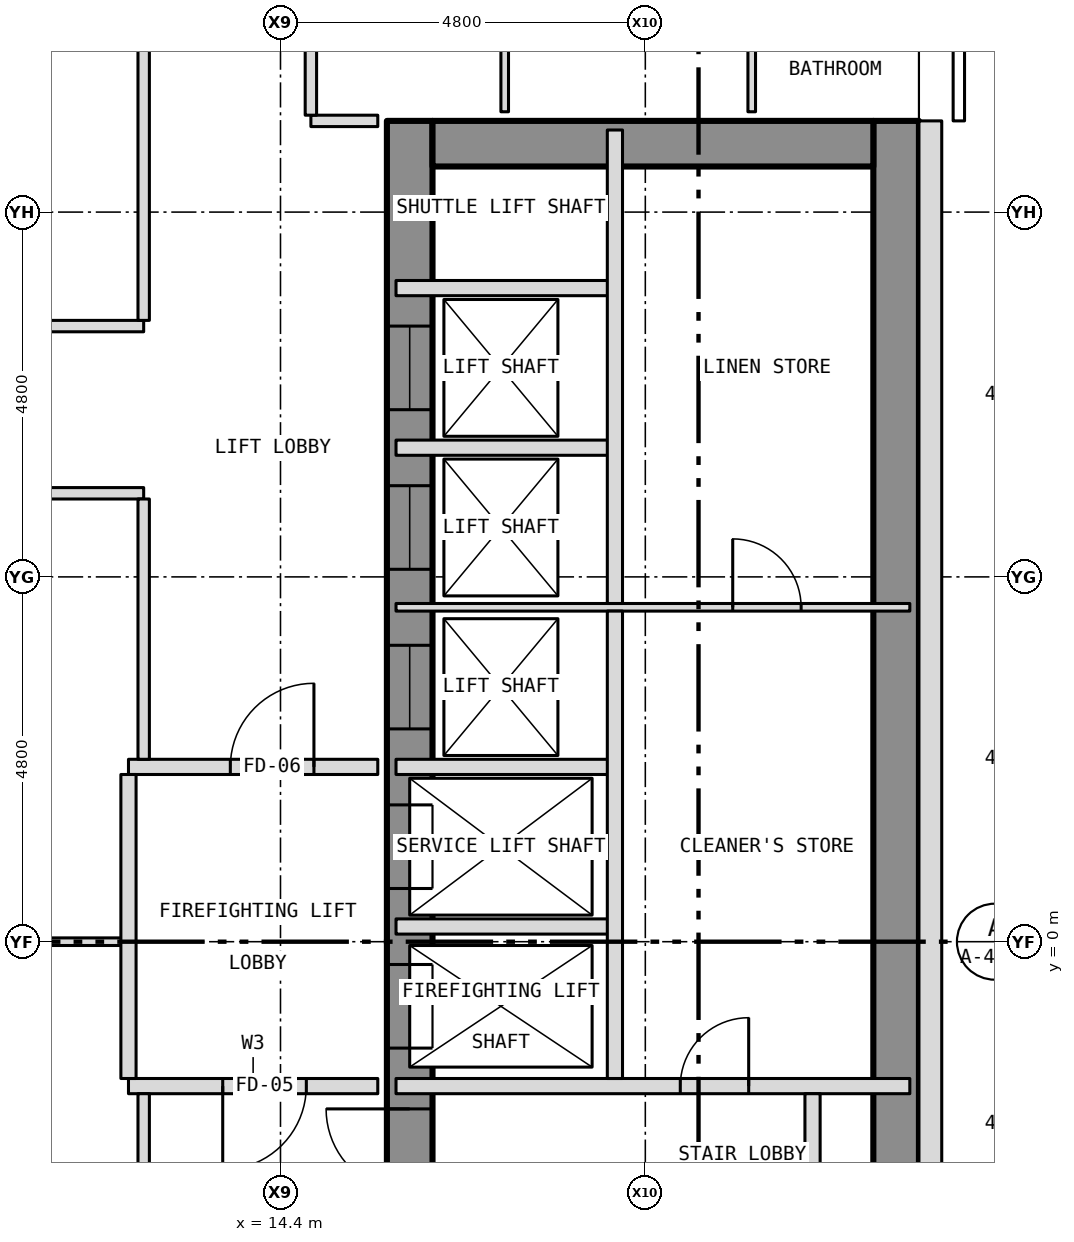
"""IFC4 building model, lengths in metres.
Left out: names, types, materials, properties, quantities, classifications, styles, units other than length and angle.
Written with IfcOpenShell. Run it as: python <this file> out.ifc"""

import sys

from ifc_helpers import new_model, si_unit, direction, frame, frame_2d, origin, place, context, subcontext, project, spatial, rectangle, extrude, element, fill, save


model = new_model("IFC4")
c1 = context("Model", 3, precision=1e-05, world=origin(), true_north=direction((0.0, 1.0)))
c2 = subcontext(c1, "Body", "Model", "MODEL_VIEW")
j1 = project(units=[si_unit("LENGTHUNIT", "METRE"), si_unit("PLANEANGLEUNIT", "RADIAN")], contexts=[c1])
p1 = place(None, origin())
s1 = spatial("IfcSite", under=j1, at=p1, CompositionType="ELEMENT")
p2 = place(p1, origin())
s2 = spatial("IfcBuilding", under=s1, at=p2, CompositionType="ELEMENT")
p3 = place(p2, frame((0.0, 0.0, 96.0)))
s3 = spatial("IfcBuildingStorey", under=s2, at=p3, CompositionType="ELEMENT", Elevation=96.0)
p4 = place(p3, frame((16.1, -10.8, 0.0), z_axis=(0.0, 0.0, 1.0), x_axis=(0.0, 1.0, 0.0)))
e1 = element("IfcWall", 1, at=p4, inside=s3, PredefinedType="SHEAR", context=c2, shape_type="SweptSolid", body=[
    extrude(rectangle(XDim=21.6, YDim=0.6, at=frame_2d((10.8, 0.0))), origin(), (0.0, 0.0, 1.0), 3.25),
])
p5 = place(p4, frame((9.4, 0.0, 0.0)))
e2 = element("IfcOpeningElement", 2, at=p5, cuts=e1, PredefinedType="OPENING", context=c2, shape_type="SweptSolid", body=[
    extrude(rectangle(XDim=1.1, YDim=2.1, at=frame_2d((0.55, 1.05))), frame((0.0, 0.312, 0.0), z_axis=(0.0, -1.0, 0.0), x_axis=(1.0, 0.0, 0.0)), (0.0, 0.0, 1.0), 0.624),
])
p6 = place(p4, frame((11.5, 0.0, 0.0)))
e3 = element("IfcOpeningElement", 3, at=p6, cuts=e1, PredefinedType="OPENING", context=c2, shape_type="SweptSolid", body=[
    extrude(rectangle(XDim=1.1, YDim=2.1, at=frame_2d((0.55, 1.05))), frame((0.0, 0.312, 0.0), z_axis=(0.0, -1.0, 0.0), x_axis=(1.0, 0.0, 0.0)), (0.0, 0.0, 1.0), 0.624),
])
p7 = place(p4, frame((13.6, 0.0, 0.0)))
e4 = element("IfcOpeningElement", 4, at=p7, cuts=e1, PredefinedType="OPENING", context=c2, shape_type="SweptSolid", body=[
    extrude(rectangle(XDim=1.1, YDim=2.1, at=frame_2d((0.55, 1.05))), frame((0.0, 0.312, 0.0), z_axis=(0.0, -1.0, 0.0), x_axis=(1.0, 0.0, 0.0)), (0.0, 0.0, 1.0), 0.624),
])
p8 = place(p4, frame((15.7, 0.0, 0.0)))
e5 = element("IfcOpeningElement", 5, at=p8, cuts=e1, PredefinedType="OPENING", context=c2, shape_type="SweptSolid", body=[
    extrude(rectangle(XDim=1.1, YDim=2.1, at=frame_2d((0.55, 1.05))), frame((0.0, 0.312, 0.0), z_axis=(0.0, -1.0, 0.0), x_axis=(1.0, 0.0, 0.0)), (0.0, 0.0, 1.0), 0.624),
])
p9 = place(p4, frame((17.8, 0.0, 0.0)))
e6 = element("IfcOpeningElement", 6, at=p9, cuts=e1, PredefinedType="OPENING", context=c2, shape_type="SweptSolid", body=[
    extrude(rectangle(XDim=1.1, YDim=2.1, at=frame_2d((0.55, 1.05))), frame((0.0, 0.312, 0.0), z_axis=(0.0, -1.0, 0.0), x_axis=(1.0, 0.0, 0.0)), (0.0, 0.0, 1.0), 0.624),
])
p10 = place(p4, frame((5.642, 0.0, 0.0)))
e7 = element("IfcOpeningElement", 7, at=p10, cuts=e1, PredefinedType="OPENING", context=c2, shape_type="SweptSolid", body=[
    extrude(rectangle(XDim=1.1, YDim=2.1, at=frame_2d((0.55, 1.05))), frame((0.0, 0.312, 0.0), z_axis=(0.0, -1.0, 0.0), x_axis=(1.0, 0.0, 0.0)), (0.0, 0.0, 1.0), 0.624),
])
p11 = place(p4, frame((7.5, 0.0, 0.0)))
e8 = element("IfcOpeningElement", 8, at=p11, cuts=e1, PredefinedType="OPENING", context=c2, shape_type="SweptSolid", body=[
    extrude(rectangle(XDim=1.1, YDim=2.1, at=frame_2d((0.55, 1.05))), frame((0.0, 0.312, 0.0), z_axis=(0.0, -1.0, 0.0), x_axis=(1.0, 0.0, 0.0)), (0.0, 0.0, 1.0), 0.624),
])
p12 = place(p3, frame((22.5, -10.8, 0.0), z_axis=(0.0, 0.0, 1.0), x_axis=(0.0, 1.0, 0.0)))
e9 = element("IfcWall", 9, at=p12, inside=s3, PredefinedType="SHEAR", context=c2, shape_type="SweptSolid", body=[
    extrude(rectangle(XDim=21.6, YDim=0.6, at=frame_2d((10.8, 0.0))), origin(), (0.0, 0.0, 1.0), 3.25),
])
p13 = place(p3, frame((16.4, 10.5, 0.0), z_axis=(0.0, 0.0, 1.0), x_axis=(1.0, 0.0, 0.0)))
e10 = element("IfcWall", 10, at=p13, inside=s3, PredefinedType="SHEAR", context=c2, shape_type="SweptSolid", body=[
    extrude(rectangle(XDim=5.8, YDim=0.6, at=frame_2d((2.9, 0.0))), origin(), (0.0, 0.0, 1.0), 3.25),
])
p14 = place(p3, frame((22.95, -10.8, 0.0), z_axis=(0.0, 0.0, 1.0), x_axis=(0.0, 1.0, 0.0)))
e11 = element("IfcWall", 11, at=p14, inside=s3, PredefinedType="SOLIDWALL", context=c2, shape_type="SweptSolid", body=[
    extrude(rectangle(XDim=21.6, YDim=0.3, at=frame_2d((10.8, 0.0))), origin(), (0.0, 0.0, 1.0), 3.5),
])
p15 = place(p14, frame((2.95, 0.0, 1.0)))
e12 = element("IfcOpeningElement", 12, at=p15, cuts=e11, PredefinedType="OPENING", context=c2, shape_type="SweptSolid", body=[
    extrude(rectangle(XDim=0.6, YDim=1.5, at=frame_2d((0.3, 0.75))), frame((0.0, 0.162, 0.0), z_axis=(0.0, -1.0, 0.0), x_axis=(1.0, 0.0, 0.0)), (0.0, 0.0, 1.0), 0.324),
])
p16 = place(p3, frame((12.4, -1.9, 0.0), z_axis=(0.0, 0.0, 1.0), x_axis=(1.0, 0.0, 0.0)))
e13 = element("IfcWall", 13, at=p16, inside=s3, PredefinedType="PARTITIONING", context=c2, shape_type="SweptSolid", body=[
    extrude(rectangle(XDim=3.28, YDim=0.2, at=frame_2d((1.64, 0.0))), origin(), (0.0, 0.0, 1.0), 3.35),
])
p17 = place(p16, frame((1.24, 0.0, 0.0)))
e14 = element("IfcOpeningElement", 14, at=p17, cuts=e13, PredefinedType="OPENING", context=c2, shape_type="SweptSolid", body=[
    extrude(rectangle(XDim=1.1, YDim=2.1, at=frame_2d((0.55, 1.05))), frame((0.0, 0.112, 0.0), z_axis=(0.0, -1.0, 0.0), x_axis=(1.0, 0.0, 0.0)), (0.0, 0.0, 1.0), 0.224),
])
p18 = place(p3, frame((15.92, -1.9, 0.0), z_axis=(0.0, 0.0, 1.0), x_axis=(1.0, 0.0, 0.0)))
e15 = element("IfcWall", 15, at=p18, inside=s3, PredefinedType="PARTITIONING", context=c2, shape_type="SweptSolid", body=[
    extrude(rectangle(XDim=6.76, YDim=0.2, at=frame_2d((3.38, 0.0))), origin(), (0.0, 0.0, 1.0), 3.25),
])
p19 = place(p18, frame((3.74, 0.0, 0.0)))
e16 = element("IfcOpeningElement", 16, at=p19, cuts=e15, PredefinedType="OPENING", context=c2, shape_type="SweptSolid", body=[
    extrude(rectangle(XDim=0.9, YDim=2.1, at=frame_2d((0.45, 1.05))), frame((0.0, 0.112, 0.0), z_axis=(0.0, -1.0, 0.0), x_axis=(1.0, 0.0, 0.0)), (0.0, 0.0, 1.0), 0.224),
])
p20 = place(p3, frame((9.799, 0.0, 0.0), z_axis=(0.0, 0.0, 1.0), x_axis=(1.0, 0.0, 0.0)))
e17 = element("IfcWall", 17, at=p20, inside=s3, PredefinedType="PARTITIONING", context=c2, shape_type="SweptSolid", body=[
    extrude(rectangle(XDim=2.601, YDim=0.1, at=frame_2d((1.3, 0.0))), origin(), (0.0, 0.0, 1.0), 2.728),
])
p21 = place(p3, frame((15.92, 0.2, 0.0), z_axis=(0.0, 0.0, 1.0), x_axis=(1.0, 0.0, 0.0)))
e18 = element("IfcWall", 18, at=p21, inside=s3, PredefinedType="PARTITIONING", context=c2, shape_type="SweptSolid", body=[
    extrude(rectangle(XDim=2.88, YDim=0.2, at=frame_2d((1.44, 0.0))), origin(), (0.0, 0.0, 1.0), 3.25),
])
p22 = place(p3, frame((12.4, 2.3, 0.0), z_axis=(0.0, 0.0, 1.0), x_axis=(1.0, 0.0, 0.0)))
e19 = element("IfcWall", 19, at=p22, inside=s3, PredefinedType="PARTITIONING", context=c2, shape_type="SweptSolid", body=[
    extrude(rectangle(XDim=3.28, YDim=0.2, at=frame_2d((1.64, 0.0))), origin(), (0.0, 0.0, 1.0), 3.35),
])
p23 = place(p22, frame((1.34, 0.0, 0.0)))
e20 = element("IfcOpeningElement", 20, at=p23, cuts=e19, PredefinedType="OPENING", context=c2, shape_type="SweptSolid", body=[
    extrude(rectangle(XDim=1.1, YDim=2.1, at=frame_2d((0.55, 1.05))), frame((0.0, 0.112, 0.0), z_axis=(0.0, -1.0, 0.0), x_axis=(1.0, 0.0, 0.0)), (0.0, 0.0, 1.0), 0.224),
])
p24 = place(p3, frame((15.92, 2.3, 0.0), z_axis=(0.0, 0.0, 1.0), x_axis=(1.0, 0.0, 0.0)))
e21 = element("IfcWall", 21, at=p24, inside=s3, PredefinedType="PARTITIONING", context=c2, shape_type="SweptSolid", body=[
    extrude(rectangle(XDim=2.88, YDim=0.2, at=frame_2d((1.44, 0.0))), origin(), (0.0, 0.0, 1.0), 3.25),
])
p25 = place(p3, frame((15.92, 4.4, 0.0), z_axis=(0.0, 0.0, 1.0), x_axis=(1.0, 0.0, 0.0)))
e22 = element("IfcWall", 22, at=p25, inside=s3, PredefinedType="PARTITIONING", context=c2, shape_type="SweptSolid", body=[
    extrude(rectangle(XDim=6.76, YDim=0.1, at=frame_2d((3.38, 0.0))), origin(), (0.0, 0.0, 1.0), 3.25),
])
p26 = place(p25, frame((4.43, 0.0, 0.0)))
e23 = element("IfcOpeningElement", 23, at=p26, cuts=e22, PredefinedType="OPENING", context=c2, shape_type="SweptSolid", body=[
    extrude(rectangle(XDim=0.9, YDim=2.1, at=frame_2d((0.45, 1.05))), frame((0.0, 0.062, 0.0), z_axis=(0.0, -1.0, 0.0), x_axis=(1.0, 0.0, 0.0)), (0.0, 0.0, 1.0), 0.124),
])
p27 = place(p3, frame((3.3, 5.9, 0.0), z_axis=(0.0, 0.0, 1.0), x_axis=(1.0, 0.0, 0.0)))
e24 = element("IfcWall", 24, at=p27, inside=s3, PredefinedType="PARTITIONING", context=c2, shape_type="SweptSolid", body=[
    extrude(rectangle(XDim=9.3, YDim=0.15, at=frame_2d((4.65, 0.0))), origin(), (0.0, 0.0, 1.0), 3.35),
])
p28 = place(p27, frame((4.2, 0.0, 0.0)))
e25 = element("IfcOpeningElement", 25, at=p28, cuts=e24, PredefinedType="OPENING", context=c2, shape_type="SweptSolid", body=[
    extrude(rectangle(XDim=0.9, YDim=2.1, at=frame_2d((0.45, 1.05))), frame((0.0, 0.087, 0.0), z_axis=(0.0, -1.0, 0.0), x_axis=(1.0, 0.0, 0.0)), (0.0, 0.0, 1.0), 0.174),
])
p29 = place(p3, frame((15.92, 6.5, 0.0), z_axis=(0.0, 0.0, 1.0), x_axis=(1.0, 0.0, 0.0)))
e26 = element("IfcWall", 26, at=p29, inside=s3, PredefinedType="PARTITIONING", context=c2, shape_type="SweptSolid", body=[
    extrude(rectangle(XDim=2.88, YDim=0.2, at=frame_2d((1.44, 0.0))), origin(), (0.0, 0.0, 1.0), 3.25),
])
p30 = place(p3, frame((3.3, 8.1, 0.0), z_axis=(0.0, 0.0, 1.0), x_axis=(1.0, 0.0, 0.0)))
e27 = element("IfcWall", 27, at=p30, inside=s3, PredefinedType="PARTITIONING", context=c2, shape_type="SweptSolid", body=[
    extrude(rectangle(XDim=9.3, YDim=0.15, at=frame_2d((4.65, 0.0))), origin(), (0.0, 0.0, 1.0), 3.35),
])
p31 = place(p3, frame((15.92, 8.6, 0.0), z_axis=(0.0, 0.0, 1.0), x_axis=(1.0, 0.0, 0.0)))
e28 = element("IfcWall", 28, at=p31, inside=s3, PredefinedType="PARTITIONING", context=c2, shape_type="SweptSolid", body=[
    extrude(rectangle(XDim=2.88, YDim=0.2, at=frame_2d((1.44, 0.0))), origin(), (0.0, 0.0, 1.0), 3.25),
])
p32 = place(p3, frame((14.8, 10.8, 0.0), z_axis=(0.0, 0.0, 1.0), x_axis=(1.0, 0.0, 0.0)))
e29 = element("IfcWall", 29, at=p32, inside=s3, PredefinedType="PARTITIONING", context=c2, shape_type="SweptSolid", body=[
    extrude(rectangle(XDim=0.88, YDim=0.15, at=frame_2d((0.44, 0.0))), origin(), (0.0, 0.0, 1.0), 3.35),
])
p33 = place(p3, frame((12.4, -1.8, 0.0), z_axis=(0.0, 0.0, 1.0), x_axis=(0.0, 1.0, 0.0)))
e30 = element("IfcWall", 30, at=p33, inside=s3, PredefinedType="PARTITIONING", context=c2, shape_type="SweptSolid", body=[
    extrude(rectangle(XDim=4.0, YDim=0.2, at=frame_2d((2.0, 0.0))), origin(), (0.0, 0.0, 1.0), 3.35),
])
p34 = place(p3, frame((12.6, -12.525, 0.0), z_axis=(0.0, 0.0, 1.0), x_axis=(0.0, 1.0, 0.0)))
e31 = element("IfcWall", 31, at=p34, inside=s3, PredefinedType="PARTITIONING", context=c2, shape_type="SweptSolid", body=[
    extrude(rectangle(XDim=10.525, YDim=0.15, at=frame_2d((5.262, 0.0))), origin(), (0.0, 0.0, 1.0), 3.35),
])
p35 = place(p3, frame((12.6, 2.4, 0.0), z_axis=(0.0, 0.0, 1.0), x_axis=(0.0, 1.0, 0.0)))
e32 = element("IfcWall", 32, at=p35, inside=s3, PredefinedType="PARTITIONING", context=c2, shape_type="SweptSolid", body=[
    extrude(rectangle(XDim=3.425, YDim=0.15, at=frame_2d((1.712, 0.0))), origin(), (0.0, 0.0, 1.0), 3.35),
])
p36 = place(p3, frame((12.6, 8.175, 0.0), z_axis=(0.0, 0.0, 1.0), x_axis=(0.0, 1.0, 0.0)))
e33 = element("IfcWall", 33, at=p36, inside=s3, PredefinedType="PARTITIONING", context=c2, shape_type="SweptSolid", body=[
    extrude(rectangle(XDim=4.35, YDim=0.15, at=frame_2d((2.175, 0.0))), origin(), (0.0, 0.0, 1.0), 3.35),
])
p37 = place(p3, frame((14.8, 10.875, 0.0), z_axis=(0.0, 0.0, 1.0), x_axis=(0.0, 1.0, 0.0)))
e34 = element("IfcWall", 34, at=p37, inside=s3, PredefinedType="PARTITIONING", context=c2, shape_type="SweptSolid", body=[
    extrude(rectangle(XDim=3.85, YDim=0.15, at=frame_2d((1.925, 0.0))), origin(), (0.0, 0.0, 1.0), 3.35),
])
p38 = place(p37, frame((2.325, 0.0, 0.0)))
e35 = element("IfcOpeningElement", 35, at=p38, cuts=e34, PredefinedType="OPENING", context=c2, shape_type="SweptSolid", body=[
    extrude(rectangle(XDim=1.0, YDim=2.1, at=frame_2d((0.5, 1.05))), frame((0.0, 0.087, 0.0), z_axis=(0.0, -1.0, 0.0), x_axis=(1.0, 0.0, 0.0)), (0.0, 0.0, 1.0), 0.174),
])
p39 = place(p3, frame((17.35, 10.92, 0.0), z_axis=(0.0, 0.0, 1.0), x_axis=(0.0, 1.0, 0.0)))
e36 = element("IfcWall", 36, at=p39, inside=s3, PredefinedType="PARTITIONING", context=c2, shape_type="SweptSolid", body=[
    extrude(rectangle(XDim=12.36, YDim=0.1, at=frame_2d((6.18, 0.0))), origin(), (0.0, 0.0, 1.0), 3.35),
])
p40 = place(p39, frame((5.43, 0.0, 0.0)))
e37 = element("IfcOpeningElement", 37, at=p40, cuts=e36, PredefinedType="OPENING", context=c2, shape_type="SweptSolid", body=[
    extrude(rectangle(XDim=0.9, YDim=2.1, at=frame_2d((0.45, 1.05))), frame((0.0, 0.062, 0.0), z_axis=(0.0, -1.0, 0.0), x_axis=(1.0, 0.0, 0.0)), (0.0, 0.0, 1.0), 0.124),
])
p41 = place(p3, frame((18.8, -1.8, 0.0), z_axis=(0.0, 0.0, 1.0), x_axis=(0.0, 1.0, 0.0)))
e38 = element("IfcWall", 38, at=p41, inside=s3, PredefinedType="PARTITIONING", context=c2, shape_type="SweptSolid", body=[
    extrude(rectangle(XDim=6.15, YDim=0.2, at=frame_2d((3.075, 0.0))), origin(), (0.0, 0.0, 1.0), 3.25),
])
p42 = place(p3, frame((18.8, 4.45, 0.0), z_axis=(0.0, 0.0, 1.0), x_axis=(0.0, 1.0, 0.0)))
e39 = element("IfcWall", 39, at=p42, inside=s3, PredefinedType="PARTITIONING", context=c2, shape_type="SweptSolid", body=[
    extrude(rectangle(XDim=6.23, YDim=0.2, at=frame_2d((3.115, 0.0))), origin(), (0.0, 0.0, 1.0), 3.25),
])
p43 = place(p3, frame((20.6, 10.92, 0.0), z_axis=(0.0, 0.0, 1.0), x_axis=(0.0, 1.0, 0.0)))
e40 = element("IfcWall", 40, at=p43, inside=s3, PredefinedType="PARTITIONING", context=c2, shape_type="SweptSolid", body=[
    extrude(rectangle(XDim=3.03, YDim=0.1, at=frame_2d((1.515, 0.0))), origin(), (0.0, 0.0, 1.0), 3.35),
])
p44 = place(p43, frame((1.67, 0.0, 0.0)))
e41 = element("IfcOpeningElement", 41, at=p44, cuts=e40, PredefinedType="OPENING", context=c2, shape_type="SweptSolid", body=[
    extrude(rectangle(XDim=0.9, YDim=2.1, at=frame_2d((0.45, 1.05))), frame((0.0, 0.062, 0.0), z_axis=(0.0, -1.0, 0.0), x_axis=(1.0, 0.0, 0.0)), (0.0, 0.0, 1.0), 0.124),
])
p45 = place(p3, frame((21.4, -10.68, 0.0), z_axis=(0.0, 0.0, 1.0), x_axis=(0.0, 1.0, 0.0)))
e42 = element("IfcWall", 42, at=p45, inside=s3, PredefinedType="PARTITIONING", context=c2, shape_type="SweptSolid", body=[
    extrude(rectangle(XDim=8.68, YDim=0.2, at=frame_2d((4.34, 0.0))), origin(), (0.0, 0.0, 1.0), 3.25),
])
p46 = place(p45, frame((0.899, 0.0, 0.0)))
e43 = element("IfcOpeningElement", 43, at=p46, cuts=e42, PredefinedType="OPENING", context=c2, shape_type="SweptSolid", body=[
    extrude(rectangle(XDim=0.9, YDim=2.1, at=frame_2d((0.45, 1.05))), frame((0.0, 0.112, 0.0), z_axis=(0.0, -1.0, 0.0), x_axis=(1.0, 0.0, 0.0)), (0.0, 0.0, 1.0), 0.224),
])
p47 = place(p45, frame((3.569, 0.0, 0.0)))
e44 = element("IfcOpeningElement", 44, at=p47, cuts=e42, PredefinedType="OPENING", context=c2, shape_type="SweptSolid", body=[
    extrude(rectangle(XDim=0.9, YDim=2.1, at=frame_2d((0.45, 1.05))), frame((0.0, 0.112, 0.0), z_axis=(0.0, -1.0, 0.0), x_axis=(1.0, 0.0, 0.0)), (0.0, 0.0, 1.0), 0.224),
])
p48 = place(p45, frame((6.55, 0.0, 0.0)))
e45 = element("IfcOpeningElement", 45, at=p48, cuts=e42, PredefinedType="OPENING", context=c2, shape_type="SweptSolid", body=[
    extrude(rectangle(XDim=0.9, YDim=2.1, at=frame_2d((0.45, 1.05))), frame((0.0, 0.112, 0.0), z_axis=(0.0, -1.0, 0.0), x_axis=(1.0, 0.0, 0.0)), (0.0, 0.0, 1.0), 0.224),
])
p49 = place(p5, origin())
e46 = element("IfcDoor", 46, at=p49, inside=s3, OperationType="SLIDING_TO_LEFT", PredefinedType="DOOR", context=c2, shape_type="SweptSolid", body=[
    extrude(rectangle(XDim=1.1, YDim=2.1, at=frame_2d((0.55, 1.05))), frame((0.0, 0.025, 0.0), z_axis=(0.0, -1.0, 0.0), x_axis=(1.0, 0.0, 0.0)), (0.0, 0.0, 1.0), 0.05),
])
fill(e2, e46)
p50 = place(p6, origin())
e47 = element("IfcDoor", 47, at=p50, inside=s3, OperationType="SLIDING_TO_LEFT", PredefinedType="DOOR", context=c2, shape_type="SweptSolid", body=[
    extrude(rectangle(XDim=1.1, YDim=2.1, at=frame_2d((0.55, 1.05))), frame((0.0, 0.025, 0.0), z_axis=(0.0, -1.0, 0.0), x_axis=(1.0, 0.0, 0.0)), (0.0, 0.0, 1.0), 0.05),
])
fill(e3, e47)
p51 = place(p7, origin())
e48 = element("IfcDoor", 48, at=p51, inside=s3, OperationType="SLIDING_TO_LEFT", PredefinedType="DOOR", context=c2, shape_type="SweptSolid", body=[
    extrude(rectangle(XDim=1.1, YDim=2.1, at=frame_2d((0.55, 1.05))), frame((0.0, 0.025, 0.0), z_axis=(0.0, -1.0, 0.0), x_axis=(1.0, 0.0, 0.0)), (0.0, 0.0, 1.0), 0.05),
])
fill(e4, e48)
p52 = place(p8, origin())
e49 = element("IfcDoor", 49, at=p52, inside=s3, OperationType="SLIDING_TO_LEFT", PredefinedType="DOOR", context=c2, shape_type="SweptSolid", body=[
    extrude(rectangle(XDim=1.1, YDim=2.1, at=frame_2d((0.55, 1.05))), frame((0.0, 0.025, 0.0), z_axis=(0.0, -1.0, 0.0), x_axis=(1.0, 0.0, 0.0)), (0.0, 0.0, 1.0), 0.05),
])
fill(e5, e49)
p53 = place(p9, origin())
e50 = element("IfcDoor", 50, at=p53, inside=s3, OperationType="SLIDING_TO_LEFT", PredefinedType="DOOR", context=c2, shape_type="SweptSolid", body=[
    extrude(rectangle(XDim=1.1, YDim=2.1, at=frame_2d((0.55, 1.05))), frame((0.0, 0.025, 0.0), z_axis=(0.0, -1.0, 0.0), x_axis=(1.0, 0.0, 0.0)), (0.0, 0.0, 1.0), 0.05),
])
fill(e6, e50)
p54 = place(p11, origin())
e51 = element("IfcDoor", 51, at=p54, inside=s3, OperationType="SINGLE_SWING_RIGHT", PredefinedType="DOOR", context=c2, shape_type="SweptSolid", body=[
    extrude(rectangle(XDim=1.1, YDim=2.1, at=frame_2d((0.55, 1.05))), frame((0.0, 0.025, 0.0), z_axis=(0.0, -1.0, 0.0), x_axis=(1.0, 0.0, 0.0)), (0.0, 0.0, 1.0), 0.05),
])
fill(e8, e51)
p55 = place(p19, origin())
e52 = element("IfcDoor", 52, at=p55, inside=s3, OperationType="SINGLE_SWING_RIGHT", PredefinedType="DOOR", context=c2, shape_type="SweptSolid", body=[
    extrude(rectangle(XDim=0.9, YDim=2.1, at=frame_2d((0.45, 1.05))), frame((0.0, 0.025, 0.0), z_axis=(0.0, -1.0, 0.0), x_axis=(1.0, 0.0, 0.0)), (0.0, 0.0, 1.0), 0.05),
])
fill(e16, e52)
p56 = place(p26, origin())
e53 = element("IfcDoor", 53, at=p56, inside=s3, OperationType="SINGLE_SWING_LEFT", PredefinedType="DOOR", context=c2, shape_type="SweptSolid", body=[
    extrude(rectangle(XDim=0.9, YDim=2.1, at=frame_2d((0.45, 1.05))), frame((0.0, 0.025, 0.0), z_axis=(0.0, -1.0, 0.0), x_axis=(1.0, 0.0, 0.0)), (0.0, 0.0, 1.0), 0.05),
])
fill(e23, e53)
p57 = place(p17, origin())
e54 = element("IfcDoor", 54, at=p57, inside=s3, OperationType="SINGLE_SWING_LEFT", PredefinedType="DOOR", context=c2, shape_type="SweptSolid", body=[
    extrude(rectangle(XDim=1.1, YDim=2.1, at=frame_2d((0.55, 1.05))), frame((0.0, 0.025, 0.0), z_axis=(0.0, -1.0, 0.0), x_axis=(1.0, 0.0, 0.0)), (0.0, 0.0, 1.0), 0.05),
])
fill(e14, e54)
p58 = place(p23, origin())
e55 = element("IfcDoor", 55, at=p58, inside=s3, OperationType="SINGLE_SWING_RIGHT", PredefinedType="DOOR", context=c2, shape_type="SweptSolid", body=[
    extrude(rectangle(XDim=1.1, YDim=2.1, at=frame_2d((0.55, 1.05))), frame((0.0, 0.025, 0.0), z_axis=(0.0, -1.0, 0.0), x_axis=(1.0, 0.0, 0.0)), (0.0, 0.0, 1.0), 0.05),
])
fill(e20, e55)
save(model, sys.argv[1])
